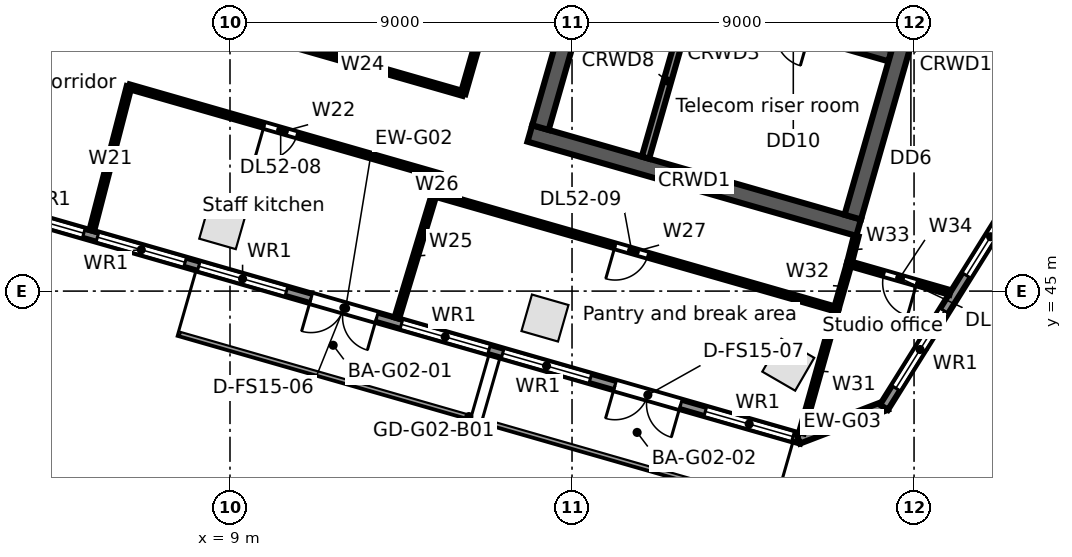
"""IFC4 building model, lengths in metres.
Left out: names, types, materials, properties, quantities, classifications, styles, units other than length and angle.
Written with IfcOpenShell. Run it as: python <this file> out.ifc"""

import sys

from ifc_helpers import new_model, si_unit, direction, frame, frame_2d, origin, origin_2d, place, context, subcontext, project, spatial, rectangle, extrude, element, fill, save


model = new_model("IFC4")
c1 = context("Model", 3, precision=1e-05, world=origin(), true_north=direction((0.0, 1.0)))
c2 = subcontext(c1, "Body", "Model", "MODEL_VIEW")
j1 = project(units=[si_unit("LENGTHUNIT", "METRE"), si_unit("PLANEANGLEUNIT", "RADIAN")], contexts=[c1])
p1 = place(None, origin())
s1 = spatial("IfcSite", under=j1, at=p1, CompositionType="ELEMENT")
p2 = place(p1, origin())
s2 = spatial("IfcBuilding", under=s1, at=p2, CompositionType="ELEMENT")
p3 = place(p2, frame((0.0, 0.0, 238.7)))
s3 = spatial("IfcBuildingStorey", under=s2, at=p3, CompositionType="ELEMENT", Elevation=238.7)
for number, where, z_axis, x_axis in (
    (1, (8.81, 46.722, 0.0), (0.0, 0.0, 1.0), (0.961, -0.276, 0.0)),
    (2, (17.288, 44.291, 0.0), (0.0, 0.0, 1.0), (0.961, -0.276, 0.0)),
    (3, (23.69, 43.063, 0.0), (0.0, 0.0, 1.0), (-0.865, 0.501, 0.0)),
):
    element("IfcColumn", number, at=place(p3, frame(where, z_axis=z_axis, x_axis=x_axis)), inside=s3, PredefinedType="COLUMN", context=c2, shape_type="SweptSolid", body=[
        extrude(rectangle(XDim=1.0, YDim=1.0, at=origin_2d()), origin(), (0.0, 0.0, 1.0), 3.9),
    ])
p4 = place(p3, frame((24.034, 41.108, 0.0), z_axis=(0.0, 0.0, 1.0), x_axis=(-0.96126060691, 0.275641153683, 0.0)))
e4 = element("IfcWall", 4, at=p4, inside=s3, PredefinedType="STANDARD", context=c2, shape_type="SweptSolid", body=[
    extrude(rectangle(XDim=24.951, YDim=0.25, at=frame_2d((12.475, 0.0))), origin(), (0.0, 0.0, 1.0), 3.62),
])
p5 = place(p4, frame((22.416, 0.0, 0.8)))
e5 = element("IfcOpeningElement", 5, at=p5, cuts=e4, PredefinedType="OPENING", context=c2, shape_type="SweptSolid", body=[
    extrude(rectangle(XDim=2.4, YDim=2.2, at=frame_2d((1.2, 1.1))), frame((0.0, 0.135, 0.0), z_axis=(0.0, -1.0, 0.0), x_axis=(1.0, 0.0, 0.0)), (0.0, 0.0, 1.0), 0.27),
])
p6 = place(p4, frame((19.643, 0.0, 0.8)))
e6 = element("IfcOpeningElement", 6, at=p6, cuts=e4, PredefinedType="OPENING", context=c2, shape_type="SweptSolid", body=[
    extrude(rectangle(XDim=2.4, YDim=2.2, at=frame_2d((1.2, 1.1))), frame((0.0, 0.135, 0.0), z_axis=(0.0, -1.0, 0.0), x_axis=(1.0, 0.0, 0.0)), (0.0, 0.0, 1.0), 0.27),
])
p7 = place(p4, frame((16.869, 0.0, 0.8)))
e7 = element("IfcOpeningElement", 7, at=p7, cuts=e4, PredefinedType="OPENING", context=c2, shape_type="SweptSolid", body=[
    extrude(rectangle(XDim=2.4, YDim=2.2, at=frame_2d((1.2, 1.1))), frame((0.0, 0.135, 0.0), z_axis=(0.0, -1.0, 0.0), x_axis=(1.0, 0.0, 0.0)), (0.0, 0.0, 1.0), 0.27),
])
p8 = place(p4, frame((14.096, 0.0, 0.8)))
e8 = element("IfcOpeningElement", 8, at=p8, cuts=e4, PredefinedType="OPENING", context=c2, shape_type="SweptSolid", body=[
    extrude(rectangle(XDim=2.4, YDim=2.2, at=frame_2d((1.2, 1.1))), frame((0.0, 0.135, 0.0), z_axis=(0.0, -1.0, 0.0), x_axis=(1.0, 0.0, 0.0)), (0.0, 0.0, 1.0), 0.27),
])
p9 = place(p4, frame((11.622, 0.0, 0.0)))
e9 = element("IfcOpeningElement", 9, at=p9, cuts=e4, PredefinedType="OPENING", context=c2, shape_type="SweptSolid", body=[
    extrude(rectangle(XDim=1.8, YDim=2.4, at=frame_2d((0.9, 1.2))), frame((0.0, 0.135, 0.0), z_axis=(0.0, -1.0, 0.0), x_axis=(1.0, 0.0, 0.0)), (0.0, 0.0, 1.0), 0.27),
])
p10 = place(p4, frame((8.549, 0.0, 0.8)))
e10 = element("IfcOpeningElement", 10, at=p10, cuts=e4, PredefinedType="OPENING", context=c2, shape_type="SweptSolid", body=[
    extrude(rectangle(XDim=2.4, YDim=2.2, at=frame_2d((1.2, 1.1))), frame((0.0, 0.135, 0.0), z_axis=(0.0, -1.0, 0.0), x_axis=(1.0, 0.0, 0.0)), (0.0, 0.0, 1.0), 0.27),
])
p11 = place(p4, frame((5.775, 0.0, 0.8)))
e11 = element("IfcOpeningElement", 11, at=p11, cuts=e4, PredefinedType="OPENING", context=c2, shape_type="SweptSolid", body=[
    extrude(rectangle(XDim=2.4, YDim=2.2, at=frame_2d((1.2, 1.1))), frame((0.0, 0.135, 0.0), z_axis=(0.0, -1.0, 0.0), x_axis=(1.0, 0.0, 0.0)), (0.0, 0.0, 1.0), 0.27),
])
p12 = place(p4, frame((3.302, 0.0, 0.0)))
e12 = element("IfcOpeningElement", 12, at=p12, cuts=e4, PredefinedType="OPENING", context=c2, shape_type="SweptSolid", body=[
    extrude(rectangle(XDim=1.8, YDim=2.4, at=frame_2d((0.9, 1.2))), frame((0.0, 0.135, 0.0), z_axis=(0.0, -1.0, 0.0), x_axis=(1.0, 0.0, 0.0)), (0.0, 0.0, 1.0), 0.27),
])
p13 = place(p4, frame((0.229, 0.0, 0.8)))
e13 = element("IfcOpeningElement", 13, at=p13, cuts=e4, PredefinedType="OPENING", context=c2, shape_type="SweptSolid", body=[
    extrude(rectangle(XDim=2.4, YDim=2.2, at=frame_2d((1.2, 1.1))), frame((0.0, 0.135, 0.0), z_axis=(0.0, -1.0, 0.0), x_axis=(1.0, 0.0, 0.0)), (0.0, 0.0, 1.0), 0.27),
])
p14 = place(p3, frame((26.27, 41.993, 0.0), z_axis=(0.0, 0.0, 1.0), x_axis=(-0.933573798066, -0.358385216722, 0.0)))
e14 = element("IfcWall", 14, at=p14, inside=s3, PredefinedType="STANDARD", context=c2, shape_type="SweptSolid", body=[
    extrude(rectangle(XDim=2.48, YDim=0.25, at=frame_2d((1.24, 0.0))), origin(), (0.0, 0.0, 1.0), 3.62),
])
p15 = place(p3, frame((37.392, 59.84, 0.0), z_axis=(0.0, 0.0, 1.0), x_axis=(-0.529919909431, -0.848047692992, 0.0)))
e15 = element("IfcWall", 15, at=p15, inside=s3, PredefinedType="STANDARD", context=c2, shape_type="SweptSolid", body=[
    extrude(rectangle(XDim=21.104, YDim=0.25, at=frame_2d((10.552, 0.0))), origin(), (0.0, 0.0, 1.0), 3.62),
])
p16 = place(p15, frame((18.112, 0.0, 0.8)))
e16 = element("IfcOpeningElement", 16, at=p16, cuts=e15, PredefinedType="OPENING", context=c2, shape_type="SweptSolid", body=[
    extrude(rectangle(XDim=2.4, YDim=2.2, at=frame_2d((1.2, 1.1))), frame((0.0, 0.135, 0.0), z_axis=(0.0, -1.0, 0.0), x_axis=(1.0, 0.0, 0.0)), (0.0, 0.0, 1.0), 0.27),
])
p17 = place(p15, frame((14.612, 0.0, 0.8)))
e17 = element("IfcOpeningElement", 17, at=p17, cuts=e15, PredefinedType="OPENING", context=c2, shape_type="SweptSolid", body=[
    extrude(rectangle(XDim=2.4, YDim=2.2, at=frame_2d((1.2, 1.1))), frame((0.0, 0.135, 0.0), z_axis=(0.0, -1.0, 0.0), x_axis=(1.0, 0.0, 0.0)), (0.0, 0.0, 1.0), 0.27),
])
p18 = place(p15, frame((11.112, 0.0, 0.8)))
e18 = element("IfcOpeningElement", 18, at=p18, cuts=e15, PredefinedType="OPENING", context=c2, shape_type="SweptSolid", body=[
    extrude(rectangle(XDim=2.4, YDim=2.2, at=frame_2d((1.2, 1.1))), frame((0.0, 0.135, 0.0), z_axis=(0.0, -1.0, 0.0), x_axis=(1.0, 0.0, 0.0)), (0.0, 0.0, 1.0), 0.27),
])
p19 = place(p15, frame((7.612, 0.0, 0.8)))
e19 = element("IfcOpeningElement", 19, at=p19, cuts=e15, PredefinedType="OPENING", context=c2, shape_type="SweptSolid", body=[
    extrude(rectangle(XDim=2.4, YDim=2.2, at=frame_2d((1.2, 1.1))), frame((0.0, 0.135, 0.0), z_axis=(0.0, -1.0, 0.0), x_axis=(1.0, 0.0, 0.0)), (0.0, 0.0, 1.0), 0.27),
])
p20 = place(p15, frame((4.112, 0.0, 0.8)))
e20 = element("IfcOpeningElement", 20, at=p20, cuts=e15, PredefinedType="OPENING", context=c2, shape_type="SweptSolid", body=[
    extrude(rectangle(XDim=2.4, YDim=2.2, at=frame_2d((1.2, 1.1))), frame((0.0, 0.135, 0.0), z_axis=(0.0, -1.0, 0.0), x_axis=(1.0, 0.0, 0.0)), (0.0, 0.0, 1.0), 0.27),
])
p21 = place(p15, frame((0.612, 0.0, 0.8)))
e21 = element("IfcOpeningElement", 21, at=p21, cuts=e15, PredefinedType="OPENING", context=c2, shape_type="SweptSolid", body=[
    extrude(rectangle(XDim=2.4, YDim=2.2, at=frame_2d((1.2, 1.1))), frame((0.0, 0.135, 0.0), z_axis=(0.0, -1.0, 0.0), x_axis=(1.0, 0.0, 0.0)), (0.0, 0.0, 1.0), 0.27),
])
p22 = place(p3, frame((16.89, 49.149, 0.0), z_axis=(0.0, 0.0, 1.0), x_axis=(0.96126248289, -0.275634611374, 0.0)))
e22 = element("IfcWall", 22, at=p22, inside=s3, PredefinedType="SOLIDWALL", context=c2, shape_type="SweptSolid", body=[
    extrude(rectangle(XDim=9.0, YDim=0.45, at=frame_2d((4.5, 0.0))), origin(), (0.0, 0.0, 1.0), 3.62),
])
p23 = place(p3, frame((21.131, 52.692, 0.0), z_axis=(0.0, 0.0, 1.0), x_axis=(0.961261488075, -0.275638080722, 0.0)))
e23 = element("IfcWall", 23, at=p23, inside=s3, PredefinedType="SOLIDWALL", context=c2, shape_type="SweptSolid", body=[
    extrude(rectangle(XDim=5.45, YDim=0.3, at=frame_2d((2.725, 0.0))), origin(), (0.0, 0.0, 1.0), 3.62),
])
p24 = place(p23, frame((2.35, 0.0, 0.0)))
e24 = element("IfcOpeningElement", 24, at=p24, cuts=e23, PredefinedType="OPENING", context=c2, shape_type="SweptSolid", body=[
    extrude(rectangle(XDim=0.9, YDim=2.1, at=frame_2d((0.45, 1.05))), frame((0.0, 0.16, 0.0), z_axis=(0.0, -1.0, 0.0), x_axis=(1.0, 0.0, 0.0)), (0.0, 0.0, 1.0), 0.32),
])
p25 = place(p3, frame((17.168, 49.303, 0.0), z_axis=(0.0, 0.0, 1.0), x_axis=(0.275638974822, 0.961261231695, 0.0)))
e25 = element("IfcWall", 25, at=p25, inside=s3, PredefinedType="SOLIDWALL", context=c2, shape_type="SweptSolid", body=[
    extrude(rectangle(XDim=11.1, YDim=0.45, at=frame_2d((5.55, 0.0))), origin(), (0.0, 0.0, 1.0), 3.62),
])
p26 = place(p25, frame((4.95, 0.0, 0.0)))
e26 = element("IfcOpeningElement", 26, at=p26, cuts=e25, PredefinedType="OPENING", context=c2, shape_type="SweptSolid", body=[
    extrude(rectangle(XDim=1.2, YDim=2.1, at=frame_2d((0.6, 1.05))), frame((0.0, 0.235, 0.0), z_axis=(0.0, -1.0, 0.0), x_axis=(1.0, 0.0, 0.0)), (0.0, 0.0, 1.0), 0.47),
])
p27 = place(p3, frame((19.932, 48.511, 0.0), z_axis=(0.0, 0.0, 1.0), x_axis=(0.275642273411, 0.961260285827, 0.0)))
e27 = element("IfcWall", 27, at=p27, inside=s3, PredefinedType="SOLIDWALL", context=c2, shape_type="SweptSolid", body=[
    extrude(rectangle(XDim=4.2, YDim=0.2, at=frame_2d((2.1, 0.0))), origin(), (0.0, 0.0, 1.0), 3.62),
])
p28 = place(p3, frame((25.387, 46.947, 0.0), z_axis=(0.0, 0.0, 1.0), x_axis=(0.275638974822, 0.961261231695, 0.0)))
e28 = element("IfcWall", 28, at=p28, inside=s3, PredefinedType="SOLIDWALL", context=c2, shape_type="SweptSolid", body=[
    extrude(rectangle(XDim=11.1, YDim=0.45, at=frame_2d((5.55, 0.0))), origin(), (0.0, 0.0, 1.0), 3.62),
])
p29 = place(p28, frame((4.95, 0.0, 0.0)))
e29 = element("IfcOpeningElement", 29, at=p29, cuts=e28, PredefinedType="OPENING", context=c2, shape_type="SweptSolid", body=[
    extrude(rectangle(XDim=1.2, YDim=2.1, at=frame_2d((0.6, 1.05))), frame((0.0, 0.235, 0.0), z_axis=(0.0, -1.0, 0.0), x_axis=(1.0, 0.0, 0.0)), (0.0, 0.0, 1.0), 0.47),
])
p30 = place(p3, frame((5.363, 46.592, 0.0), z_axis=(0.0, 0.0, 1.0), x_axis=(0.250765055388, 0.968047977631, 0.0)))
e30 = element("IfcWall", 30, at=p30, inside=s3, PredefinedType="PARTITIONING", context=c2, shape_type="SweptSolid", body=[
    extrude(rectangle(XDim=3.912, YDim=0.125, at=frame_2d((1.956, 0.0))), origin(), (0.0, 0.0, 1.0), 2.988),
])
p31 = place(p3, frame((6.344, 50.379, 0.0), z_axis=(0.0, 0.0, 1.0), x_axis=(0.961251402136, -0.275673252041, 0.0)))
e31 = element("IfcWall", 31, at=p31, inside=s3, PredefinedType="PARTITIONING", context=c2, shape_type="SweptSolid", body=[
    extrude(rectangle(XDim=8.499, YDim=0.125, at=frame_2d((4.25, 0.0))), origin(), (0.0, 0.0, 1.0), 2.8),
])
p32 = place(p31, frame((3.7, 0.0, 0.0)))
e32 = element("IfcOpeningElement", 32, at=p32, cuts=e31, PredefinedType="OPENING", context=c2, shape_type="SweptSolid", body=[
    extrude(rectangle(XDim=0.9, YDim=2.1, at=frame_2d((0.45, 1.05))), frame((0.0, 0.073, 0.0), z_axis=(0.0, -1.0, 0.0), x_axis=(1.0, 0.0, 0.0)), (0.0, 0.0, 1.0), 0.145),
])
p33 = place(p3, frame((9.848, 51.715, 0.0), z_axis=(0.0, 0.0, 1.0), x_axis=(0.961258850611, -0.275647278458, 0.0)))
e33 = element("IfcWall", 33, at=p33, inside=s3, PredefinedType="PARTITIONING", context=c2, shape_type="SweptSolid", body=[
    extrude(rectangle(XDim=5.5, YDim=0.125, at=frame_2d((2.75, 0.0))), origin(), (0.0, 0.0, 1.0), 2.8),
])
p34 = place(p3, frame((13.39, 44.29, 0.0), z_axis=(0.0, 0.0, 1.0), x_axis=(0.289389501276, 0.957211427299, 0.0)))
e34 = element("IfcWall", 34, at=p34, inside=s3, PredefinedType="PARTITIONING", context=c2, shape_type="SweptSolid", body=[
    extrude(rectangle(XDim=3.411, YDim=0.125, at=frame_2d((1.706, 0.0))), origin(), (0.0, 0.0, 1.0), 2.994),
])
p35 = place(p3, frame((14.377, 47.555, 0.0), z_axis=(0.0, 0.0, 1.0), x_axis=(0.273882785402, 0.961763078861, 0.0)))
e35 = element("IfcWall", 35, at=p35, inside=s3, PredefinedType="PARTITIONING", context=c2, shape_type="SweptSolid", body=[
    extrude(rectangle(XDim=0.5, YDim=0.125, at=frame_2d((0.25, 0.0))), origin(), (0.0, 0.0, 1.0), 3.62),
])
p36 = place(p3, frame((14.377, 47.555, 0.0), z_axis=(0.0, 0.0, 1.0), x_axis=(0.961263044958, -0.275632651182, 0.0)))
e36 = element("IfcWall", 36, at=p36, inside=s3, PredefinedType="PARTITIONING", context=c2, shape_type="SweptSolid", body=[
    extrude(rectangle(XDim=11.0, YDim=0.125, at=frame_2d((5.5, 0.0))), origin(), (0.0, 0.0, 1.0), 2.9),
])
p37 = place(p36, frame((4.95, 0.0, 0.0)))
e37 = element("IfcOpeningElement", 37, at=p37, cuts=e36, PredefinedType="OPENING", context=c2, shape_type="SweptSolid", body=[
    extrude(rectangle(XDim=0.9, YDim=2.1, at=frame_2d((0.45, 1.05))), frame((0.0, 0.073, 0.0), z_axis=(0.0, -1.0, 0.0), x_axis=(1.0, 0.0, 0.0)), (0.0, 0.0, 1.0), 0.145),
])
p38 = place(p3, frame((15.135, 50.199, 0.0), z_axis=(0.0, 0.0, 1.0), x_axis=(0.275551788837, 0.961286227753, 0.0)))
e38 = element("IfcWall", 38, at=p38, inside=s3, PredefinedType="PARTITIONING", context=c2, shape_type="SweptSolid", body=[
    extrude(rectangle(XDim=6.249, YDim=0.125, at=frame_2d((3.125, 0.0))), origin(), (0.0, 0.0, 1.0), 2.8),
])
p39 = place(p38, frame((2.7, 0.0, 0.0)))
e39 = element("IfcOpeningElement", 39, at=p39, cuts=e38, PredefinedType="OPENING", context=c2, shape_type="SweptSolid", body=[
    extrude(rectangle(XDim=0.9, YDim=2.1, at=frame_2d((0.45, 1.05))), frame((0.0, 0.073, 0.0), z_axis=(0.0, -1.0, 0.0), x_axis=(1.0, 0.0, 0.0)), (0.0, 0.0, 1.0), 0.145),
])
p40 = place(p3, frame((24.036, 41.27, 0.0), z_axis=(0.0, 0.0, 1.0), x_axis=(0.270787421954, 0.962639170256, 0.0)))
e40 = element("IfcWall", 40, at=p40, inside=s3, PredefinedType="PARTITIONING", context=c2, shape_type="SweptSolid", body=[
    extrude(rectangle(XDim=3.379, YDim=0.125, at=frame_2d((1.689, 0.0))), origin(), (0.0, 0.0, 1.0), 2.9),
])
p41 = place(p3, frame((24.951, 44.523, 0.0), z_axis=(0.0, 0.0, 1.0), x_axis=(0.27510792265, 0.961413350695, 0.0)))
e41 = element("IfcWall", 41, at=p41, inside=s3, PredefinedType="PARTITIONING", context=c2, shape_type="SweptSolid", body=[
    extrude(rectangle(XDim=1.25, YDim=0.125, at=frame_2d((0.625, 0.0))), origin(), (0.0, 0.0, 1.0), 2.9),
])
p42 = place(p3, frame((25.295, 45.725, 0.0), z_axis=(0.0, 0.0, 1.0), x_axis=(0.245522578998, 0.96939087225, 0.0)))
e42 = element("IfcWall", 42, at=p42, inside=s3, PredefinedType="PARTITIONING", context=c2, shape_type="SweptSolid", body=[
    extrude(rectangle(XDim=0.75, YDim=0.125, at=frame_2d((0.375, 0.0))), origin(), (0.0, 0.0, 1.0), 3.62),
])
p43 = place(p3, frame((25.295, 45.725, 0.0), z_axis=(0.0, 0.0, 1.0), x_axis=(0.961266594526, -0.275620271837, 0.0)))
e43 = element("IfcWall", 43, at=p43, inside=s3, PredefinedType="PARTITIONING", context=c2, shape_type="SweptSolid", body=[
    extrude(rectangle(XDim=2.761, YDim=0.125, at=frame_2d((1.38, 0.0))), origin(), (0.0, 0.0, 1.0), 2.9),
])
p44 = place(p43, frame((0.95, 0.0, 0.0)))
e44 = element("IfcOpeningElement", 44, at=p44, cuts=e43, PredefinedType="OPENING", context=c2, shape_type="SweptSolid", body=[
    extrude(rectangle(XDim=0.9, YDim=2.1, at=frame_2d((0.45, 1.05))), frame((0.0, 0.073, 0.0), z_axis=(0.0, -1.0, 0.0), x_axis=(1.0, 0.0, 0.0)), (0.0, 0.0, 1.0), 0.145),
])
p45 = place(p6, origin())
e45 = element("IfcWindow", 45, at=p45, inside=s3, PartitioningType="SINGLE_PANEL", PredefinedType="WINDOW", context=c2, shape_type="SweptSolid", body=[
    extrude(rectangle(XDim=2.4, YDim=2.2, at=frame_2d((1.2, 1.1))), frame((0.0, 0.03, 0.0), z_axis=(0.0, -1.0, 0.0), x_axis=(1.0, 0.0, 0.0)), (0.0, 0.0, 1.0), 0.06),
])
fill(e6, e45)
p46 = place(p7, origin())
e46 = element("IfcWindow", 46, at=p46, inside=s3, PartitioningType="SINGLE_PANEL", PredefinedType="WINDOW", context=c2, shape_type="SweptSolid", body=[
    extrude(rectangle(XDim=2.4, YDim=2.2, at=frame_2d((1.2, 1.1))), frame((0.0, 0.03, 0.0), z_axis=(0.0, -1.0, 0.0), x_axis=(1.0, 0.0, 0.0)), (0.0, 0.0, 1.0), 0.06),
])
fill(e7, e46)
p47 = place(p8, origin())
e47 = element("IfcWindow", 47, at=p47, inside=s3, PartitioningType="SINGLE_PANEL", PredefinedType="WINDOW", context=c2, shape_type="SweptSolid", body=[
    extrude(rectangle(XDim=2.4, YDim=2.2, at=frame_2d((1.2, 1.1))), frame((0.0, 0.03, 0.0), z_axis=(0.0, -1.0, 0.0), x_axis=(1.0, 0.0, 0.0)), (0.0, 0.0, 1.0), 0.06),
])
fill(e8, e47)
p48 = place(p9, origin())
e48 = element("IfcDoor", 48, at=p48, inside=s3, OperationType="DOUBLE_DOOR_SINGLE_SWING", PredefinedType="DOOR", context=c2, shape_type="SweptSolid", body=[
    extrude(rectangle(XDim=1.8, YDim=2.4, at=frame_2d((0.9, 1.2))), frame((0.0, 0.025, 0.0), z_axis=(0.0, -1.0, 0.0), x_axis=(1.0, 0.0, 0.0)), (0.0, 0.0, 1.0), 0.05),
])
fill(e9, e48)
p49 = place(p10, origin())
e49 = element("IfcWindow", 49, at=p49, inside=s3, PartitioningType="SINGLE_PANEL", PredefinedType="WINDOW", context=c2, shape_type="SweptSolid", body=[
    extrude(rectangle(XDim=2.4, YDim=2.2, at=frame_2d((1.2, 1.1))), frame((0.0, 0.03, 0.0), z_axis=(0.0, -1.0, 0.0), x_axis=(1.0, 0.0, 0.0)), (0.0, 0.0, 1.0), 0.06),
])
fill(e10, e49)
p50 = place(p11, origin())
e50 = element("IfcWindow", 50, at=p50, inside=s3, PartitioningType="SINGLE_PANEL", PredefinedType="WINDOW", context=c2, shape_type="SweptSolid", body=[
    extrude(rectangle(XDim=2.4, YDim=2.2, at=frame_2d((1.2, 1.1))), frame((0.0, 0.03, 0.0), z_axis=(0.0, -1.0, 0.0), x_axis=(1.0, 0.0, 0.0)), (0.0, 0.0, 1.0), 0.06),
])
fill(e11, e50)
p51 = place(p12, origin())
e51 = element("IfcDoor", 51, at=p51, inside=s3, OperationType="DOUBLE_DOOR_SINGLE_SWING", PredefinedType="DOOR", context=c2, shape_type="SweptSolid", body=[
    extrude(rectangle(XDim=1.8, YDim=2.4, at=frame_2d((0.9, 1.2))), frame((0.0, 0.025, 0.0), z_axis=(0.0, -1.0, 0.0), x_axis=(1.0, 0.0, 0.0)), (0.0, 0.0, 1.0), 0.05),
])
fill(e12, e51)
p52 = place(p13, origin())
e52 = element("IfcWindow", 52, at=p52, inside=s3, PartitioningType="SINGLE_PANEL", PredefinedType="WINDOW", context=c2, shape_type="SweptSolid", body=[
    extrude(rectangle(XDim=2.4, YDim=2.2, at=frame_2d((1.2, 1.1))), frame((0.0, 0.03, 0.0), z_axis=(0.0, -1.0, 0.0), x_axis=(1.0, 0.0, 0.0)), (0.0, 0.0, 1.0), 0.06),
])
fill(e13, e52)
p53 = place(p16, origin())
e53 = element("IfcWindow", 53, at=p53, inside=s3, PartitioningType="SINGLE_PANEL", PredefinedType="WINDOW", context=c2, shape_type="SweptSolid", body=[
    extrude(rectangle(XDim=2.4, YDim=2.2, at=frame_2d((1.2, 1.1))), frame((0.0, 0.03, 0.0), z_axis=(0.0, -1.0, 0.0), x_axis=(1.0, 0.0, 0.0)), (0.0, 0.0, 1.0), 0.06),
])
fill(e16, e53)
p54 = place(p17, origin())
e54 = element("IfcWindow", 54, at=p54, inside=s3, PartitioningType="SINGLE_PANEL", PredefinedType="WINDOW", context=c2, shape_type="SweptSolid", body=[
    extrude(rectangle(XDim=2.4, YDim=2.2, at=frame_2d((1.2, 1.1))), frame((0.0, 0.03, 0.0), z_axis=(0.0, -1.0, 0.0), x_axis=(1.0, 0.0, 0.0)), (0.0, 0.0, 1.0), 0.06),
])
fill(e17, e54)
p55 = place(p32, frame((0.9, 0.0, 0.0), z_axis=(0.0, 0.0, 1.0), x_axis=(-1.0, 0.0, 0.0)))
e55 = element("IfcDoor", 55, at=p55, inside=s3, OperationType="SINGLE_SWING_RIGHT", PredefinedType="DOOR", context=c2, shape_type="SweptSolid", body=[
    extrude(rectangle(XDim=0.9, YDim=2.1, at=frame_2d((0.45, 1.05))), frame((0.0, 0.025, 0.0), z_axis=(0.0, -1.0, 0.0), x_axis=(1.0, 0.0, 0.0)), (0.0, 0.0, 1.0), 0.05),
])
fill(e32, e55)
p56 = place(p37, frame((0.9, 0.0, 0.0), z_axis=(0.0, 0.0, 1.0), x_axis=(-1.0, 0.0, 0.0)))
e56 = element("IfcDoor", 56, at=p56, inside=s3, OperationType="SINGLE_SWING_RIGHT", PredefinedType="DOOR", context=c2, shape_type="SweptSolid", body=[
    extrude(rectangle(XDim=0.9, YDim=2.1, at=frame_2d((0.45, 1.05))), frame((0.0, 0.025, 0.0), z_axis=(0.0, -1.0, 0.0), x_axis=(1.0, 0.0, 0.0)), (0.0, 0.0, 1.0), 0.05),
])
fill(e37, e56)
p57 = place(p44, frame((0.9, 0.0, 0.0), z_axis=(0.0, 0.0, 1.0), x_axis=(-1.0, 0.0, 0.0)))
e57 = element("IfcDoor", 57, at=p57, inside=s3, OperationType="SINGLE_SWING_LEFT", PredefinedType="DOOR", context=c2, shape_type="SweptSolid", body=[
    extrude(rectangle(XDim=0.9, YDim=2.1, at=frame_2d((0.45, 1.05))), frame((0.0, 0.025, 0.0), z_axis=(0.0, -1.0, 0.0), x_axis=(1.0, 0.0, 0.0)), (0.0, 0.0, 1.0), 0.05),
])
fill(e44, e57)
save(model, sys.argv[1])
